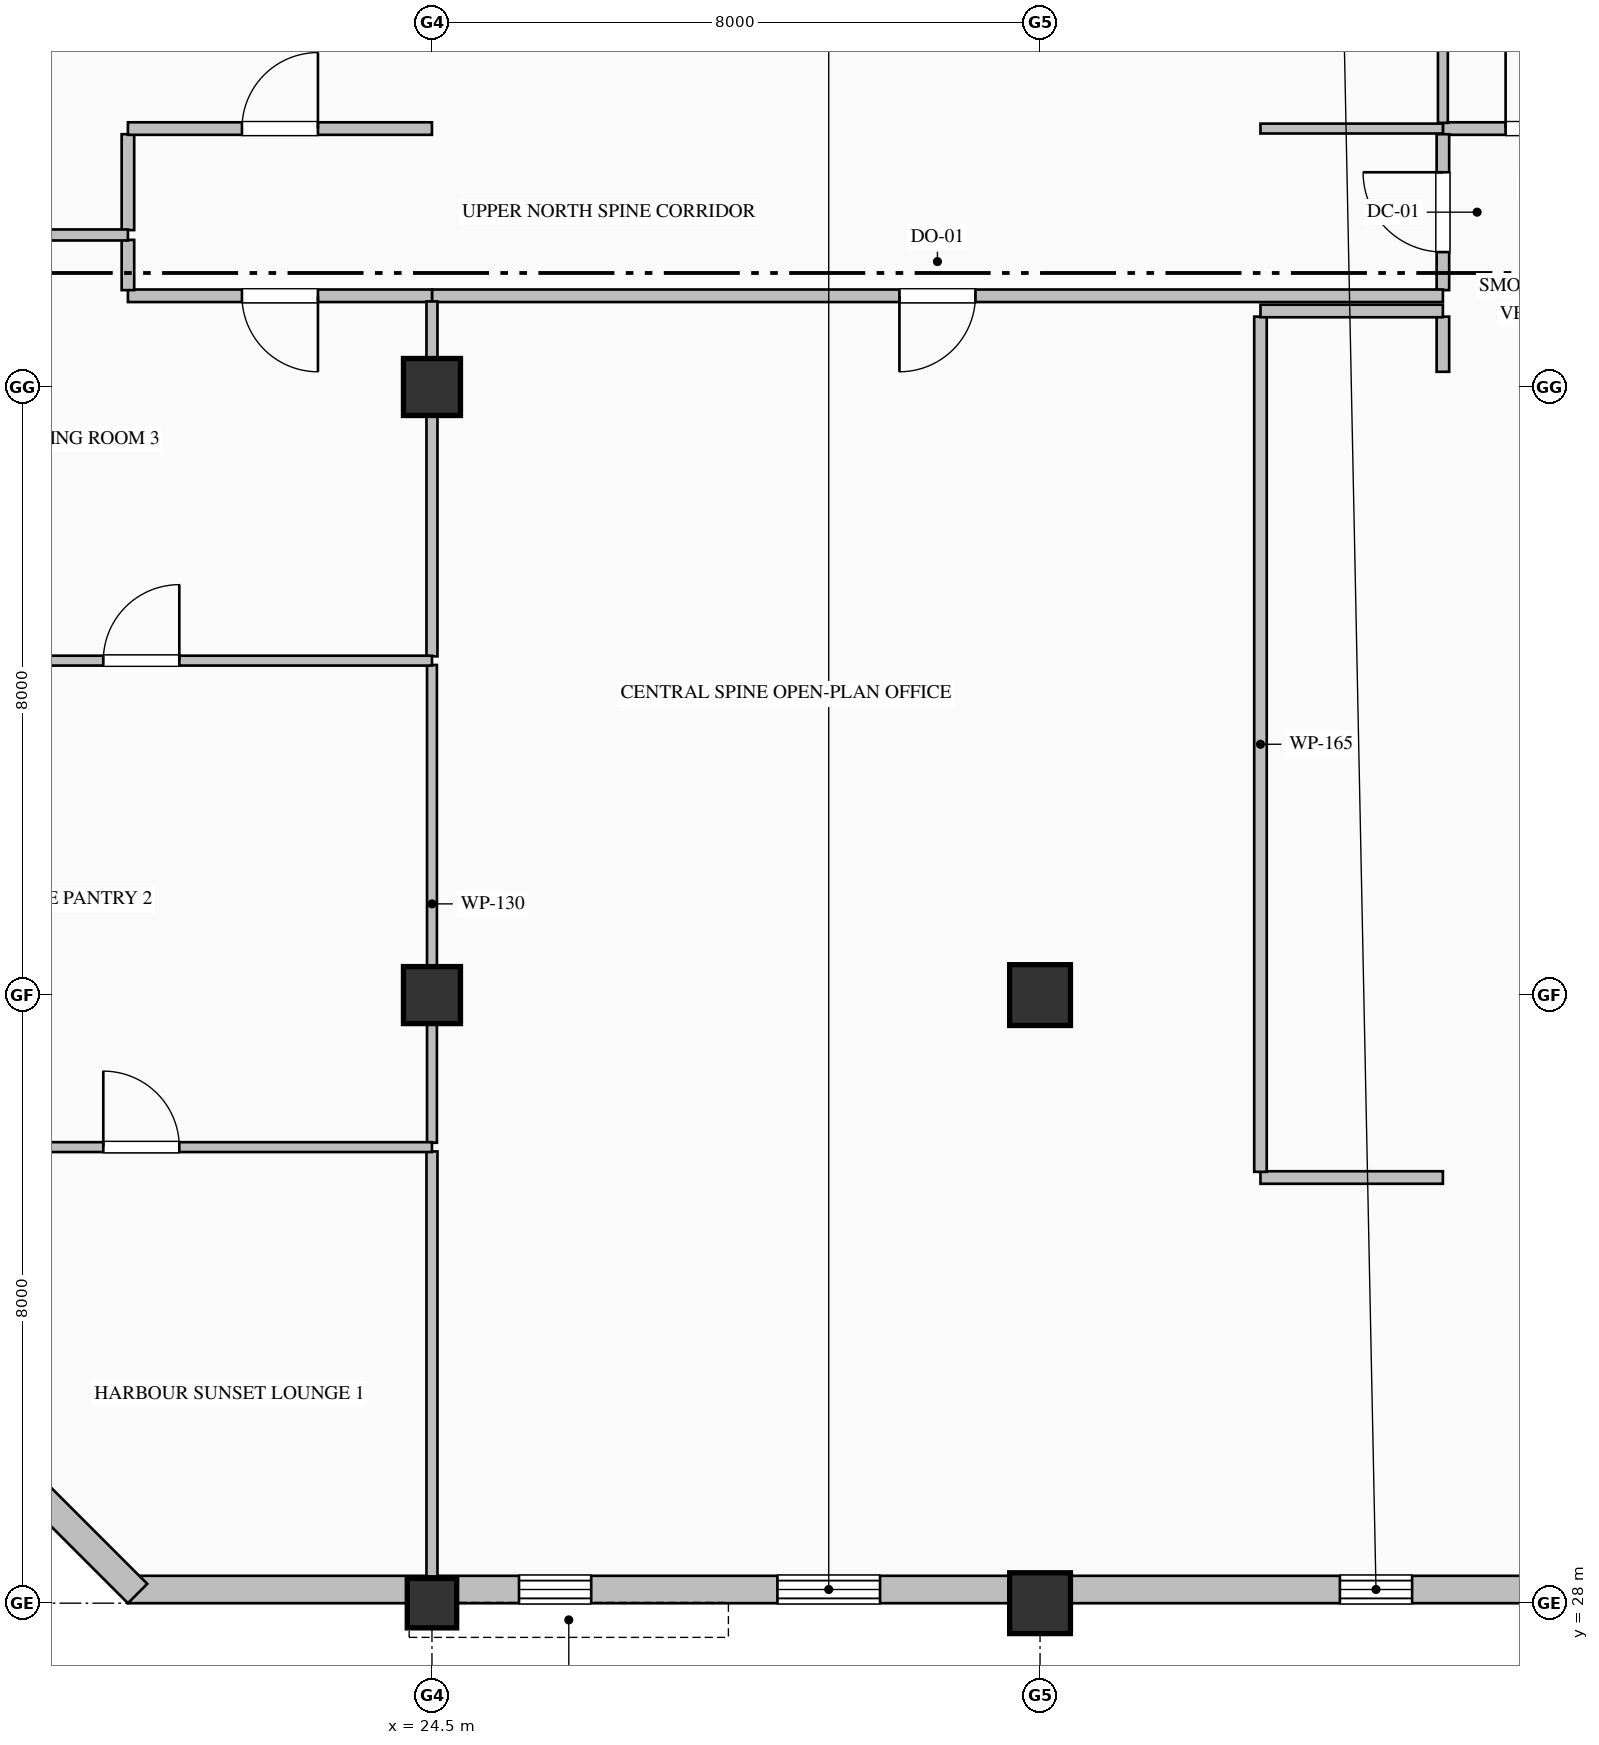
"""IFC4 building model, lengths in metres.
Left out: names, types, materials, properties, quantities, classifications, styles, units other than length and angle.
Written with IfcOpenShell. Run it as: python <this file> out.ifc"""

import sys

from ifc_helpers import new_model, si_unit, direction, frame, frame_2d, origin, origin_2d, place, context, subcontext, project, spatial, rectangle, hollow_rectangle, extrude, element, fill, save


model = new_model("IFC4")
c1 = context("Model", 3, precision=1e-05, world=origin(), true_north=direction((0.0, 1.0)))
c2 = subcontext(c1, "Body", "Model", "MODEL_VIEW")
j1 = project(units=[si_unit("LENGTHUNIT", "METRE"), si_unit("PLANEANGLEUNIT", "RADIAN")], contexts=[c1])
p1 = place(None, origin())
s1 = spatial("IfcSite", under=j1, at=p1, CompositionType="ELEMENT")
p2 = place(p1, origin())
s2 = spatial("IfcBuilding", under=s1, at=p2, CompositionType="ELEMENT")
p3 = place(p2, frame((0.0, 0.0, 331.2)))
s3 = spatial("IfcBuildingStorey", under=s2, at=p3, CompositionType="ELEMENT", Elevation=331.2)
p4 = place(p3, frame((24.5, 28.0, 0.0), z_axis=(0.0, 0.0, 1.0), x_axis=(1.0, 0.0, 0.0)))
e1 = element("IfcColumn", 1, at=p4, inside=s3, PredefinedType="COLUMN", context=c2, shape_type="SweptSolid", body=[
    extrude(hollow_rectangle(XDim=0.65, YDim=0.65, WallThickness=0.028, at=origin_2d()), origin(), (0.0, 0.0, 1.0), 4.0),
])
for number, where, z_axis, x_axis in (
    (2, (24.5, 36.0, 0.0), (0.0, 0.0, 1.0), (1.0, 0.0, 0.0)),
    (3, (24.5, 44.0, 0.0), (0.0, 0.0, 1.0), (1.0, 0.0, 0.0)),
):
    element("IfcColumn", number, at=place(p3, frame(where, z_axis=z_axis, x_axis=x_axis)), inside=s3, PredefinedType="COLUMN", context=c2, shape_type="SweptSolid", body=[
        extrude(rectangle(XDim=0.75, YDim=0.75, at=origin_2d()), origin(), (0.0, 0.0, 1.0), 4.0),
    ])
for number, where, z_axis, x_axis in (
    (4, (32.5, 28.0, 0.0), (0.0, 0.0, 1.0), (1.0, 0.0, 0.0)),
    (5, (32.5, 36.0, 0.0), (0.0, 0.0, 1.0), (1.0, 0.0, 0.0)),
):
    element("IfcColumn", number, at=place(p3, frame(where, z_axis=z_axis, x_axis=x_axis)), inside=s3, PredefinedType="COLUMN", context=c2, shape_type="SweptSolid", body=[
        extrude(hollow_rectangle(XDim=0.8, YDim=0.8, WallThickness=0.032, at=origin_2d()), origin(), (0.0, 0.0, 1.0), 4.0),
    ])
p5 = place(p3, frame((40.52, 28.18, 0.0), z_axis=(0.0, 0.0, 1.0), x_axis=(-1.0, 0.0, 0.0)))
e6 = element("IfcWall", 6, at=p5, inside=s3, PredefinedType="SOLIDWALL", context=c2, shape_type="SweptSolid", body=[
    extrude(rectangle(XDim=20.02, YDim=0.36, at=frame_2d((10.01, 0.0))), origin(), (0.0, 0.0, 1.0), 3.185),
])
p6 = place(p5, frame((3.125, 0.0, 0.9)))
e7 = element("IfcOpeningElement", 7, at=p6, cuts=e6, PredefinedType="OPENING", context=c2, shape_type="SweptSolid", body=[
    extrude(rectangle(XDim=0.95, YDim=1.85, at=frame_2d((0.475, 0.925))), frame((0.0, 0.19, 0.0), z_axis=(0.0, -1.0, 0.0), x_axis=(1.0, 0.0, 0.0)), (0.0, 0.0, 1.0), 0.38),
])
p7 = place(p5, frame((10.125, 0.0, 0.9)))
e8 = element("IfcOpeningElement", 8, at=p7, cuts=e6, PredefinedType="OPENING", context=c2, shape_type="SweptSolid", body=[
    extrude(rectangle(XDim=1.35, YDim=1.85, at=frame_2d((0.675, 0.925))), frame((0.0, 0.19, 0.0), z_axis=(0.0, -1.0, 0.0), x_axis=(1.0, 0.0, 0.0)), (0.0, 0.0, 1.0), 0.38),
])
p8 = place(p5, frame((13.925, 0.0, 0.9)))
e9 = element("IfcOpeningElement", 9, at=p8, cuts=e6, PredefinedType="OPENING", context=c2, shape_type="SweptSolid", body=[
    extrude(rectangle(XDim=0.95, YDim=1.85, at=frame_2d((0.475, 0.925))), frame((0.0, 0.19, 0.0), z_axis=(0.0, -1.0, 0.0), x_axis=(1.0, 0.0, 0.0)), (0.0, 0.0, 1.0), 0.38),
])
for number, where, z_axis, x_axis in (
    (10, (20.627, 28.127, 0.0), (0.0, 0.0, 1.0), (-0.707, 0.707, 0.0)),
    (11, (16.627, 47.873, 0.0), (0.0, 0.0, 1.0), (0.707, 0.707, 0.0)),
):
    element("IfcWall", number, at=place(p3, frame(where, z_axis=z_axis, x_axis=x_axis)), inside=s3, PredefinedType="SOLIDWALL", context=c2, shape_type="SweptSolid", body=[
        extrude(rectangle(XDim=5.657, YDim=0.36, at=frame_2d((2.828, 0.0))), origin(), (0.0, 0.0, 1.0), 3.785),
    ])
p9 = place(p3, frame((37.8, 47.4, 0.0), z_axis=(0.0, 0.0, 1.0), x_axis=(1.0, 0.0, 0.0)))
e12 = element("IfcWall", 12, at=p9, inside=s3, PredefinedType="PARTITIONING", context=c2, shape_type="SweptSolid", body=[
    extrude(rectangle(XDim=2.7, YDim=0.165, at=frame_2d((1.35, 0.0))), origin(), (0.0, 0.0, 1.0), 3.785),
])
p10 = place(p9, frame((0.825, 0.0, 0.0)))
e13 = element("IfcOpeningElement", 13, at=p10, cuts=e12, PredefinedType="OPENING", context=c2, shape_type="SweptSolid", body=[
    extrude(rectangle(XDim=1.05, YDim=2.15, at=frame_2d((0.525, 1.075))), frame((0.0, 0.093, 0.0), z_axis=(0.0, -1.0, 0.0), x_axis=(1.0, 0.0, 0.0)), (0.0, 0.0, 1.0), 0.185),
])
p11 = place(p3, frame((37.8, 45.274, 0.0), z_axis=(0.0, 0.0, 1.0), x_axis=(0.0, 1.0, 0.0)))
e14 = element("IfcWall", 14, at=p11, inside=s3, PredefinedType="PARTITIONING", context=c2, shape_type="SweptSolid", body=[
    extrude(rectangle(XDim=2.051, YDim=0.165, at=frame_2d((1.025, 0.0))), origin(), (0.0, 0.0, 1.0), 3.785),
])
p12 = place(p11, frame((0.5, 0.0, 0.0)))
e15 = element("IfcOpeningElement", 15, at=p12, cuts=e14, PredefinedType="OPENING", context=c2, shape_type="SweptSolid", body=[
    extrude(rectangle(XDim=1.05, YDim=2.15, at=frame_2d((0.525, 1.075))), frame((0.0, 0.093, 0.0), z_axis=(0.0, -1.0, 0.0), x_axis=(1.0, 0.0, 0.0)), (0.0, 0.0, 1.0), 0.185),
])
p13 = place(p3, frame((37.8, 44.2, 0.0), z_axis=(0.0, 0.0, 1.0), x_axis=(0.0, 1.0, 0.0)))
e16 = element("IfcWall", 16, at=p13, inside=s3, PredefinedType="PARTITIONING", context=c2, shape_type="SweptSolid", body=[
    extrude(rectangle(XDim=0.726, YDim=0.165, at=frame_2d((0.363, 0.0))), origin(), (0.0, 0.0, 1.0), 3.785),
])
p14 = place(p3, frame((37.8, 47.475, 0.0), z_axis=(0.0, 0.0, 1.0), x_axis=(0.0, 1.0, 0.0)))
e17 = element("IfcWall", 17, at=p14, inside=s3, PredefinedType="PARTITIONING", context=c2, shape_type="SweptSolid", body=[
    extrude(rectangle(XDim=4.173, YDim=0.13, at=frame_2d((2.087, 0.0))), origin(), (0.0, 0.0, 1.0), 3.785),
])
p15 = place(p14, frame((1.577, 0.0, 0.0)))
e18 = element("IfcOpeningElement", 18, at=p15, cuts=e17, PredefinedType="OPENING", context=c2, shape_type="SweptSolid", body=[
    extrude(rectangle(XDim=1.02, YDim=2.15, at=frame_2d((0.51, 1.075))), frame((0.0, 0.075, 0.0), z_axis=(0.0, -1.0, 0.0), x_axis=(1.0, 0.0, 0.0)), (0.0, 0.0, 1.0), 0.15),
])
p16 = place(p3, frame((37.8, 47.4, 0.0), z_axis=(0.0, 0.0, 1.0), x_axis=(-1.0, 0.0, 0.0)))
e19 = element("IfcWall", 19, at=p16, inside=s3, PredefinedType="PARTITIONING", context=c2, shape_type="SweptSolid", body=[
    extrude(rectangle(XDim=2.4, YDim=0.13, at=frame_2d((1.2, 0.0))), origin(), (0.0, 0.0, 1.0), 3.785),
])
p17 = place(p3, frame((37.8, 45.2, 0.0), z_axis=(0.0, 0.0, 1.0), x_axis=(-1.0, 0.0, 0.0)))
e20 = element("IfcWall", 20, at=p17, inside=s3, PredefinedType="PARTITIONING", context=c2, shape_type="SweptSolid", body=[
    extrude(rectangle(XDim=13.3, YDim=0.165, at=frame_2d((6.65, 0.0))), origin(), (0.0, 0.0, 1.0), 3.785),
])
p18 = place(p17, frame((6.15, 0.0, 0.0)))
e21 = element("IfcOpeningElement", 21, at=p18, cuts=e20, PredefinedType="OPENING", context=c2, shape_type="SweptSolid", body=[
    extrude(rectangle(XDim=1.0, YDim=2.15, at=frame_2d((0.5, 1.075))), frame((0.0, 0.093, 0.0), z_axis=(0.0, -1.0, 0.0), x_axis=(1.0, 0.0, 0.0)), (0.0, 0.0, 1.0), 0.185),
])
p19 = place(p3, frame((24.5, 45.2, 0.0), z_axis=(0.0, 0.0, 1.0), x_axis=(-1.0, 0.0, 0.0)))
e22 = element("IfcWall", 22, at=p19, inside=s3, PredefinedType="PARTITIONING", context=c2, shape_type="SweptSolid", body=[
    extrude(rectangle(XDim=4.0, YDim=0.165, at=frame_2d((2.0, 0.0))), origin(), (0.0, 0.0, 1.0), 3.785),
])
p20 = place(p19, frame((1.5, 0.0, 0.0)))
e23 = element("IfcOpeningElement", 23, at=p20, cuts=e22, PredefinedType="OPENING", context=c2, shape_type="SweptSolid", body=[
    extrude(rectangle(XDim=1.0, YDim=2.15, at=frame_2d((0.5, 1.075))), frame((0.0, 0.093, 0.0), z_axis=(0.0, -1.0, 0.0), x_axis=(1.0, 0.0, 0.0)), (0.0, 0.0, 1.0), 0.185),
])
p21 = place(p3, frame((20.5, 45.274, 0.0), z_axis=(0.0, 0.0, 1.0), x_axis=(0.0, 1.0, 0.0)))
e24 = element("IfcWall", 24, at=p21, inside=s3, PredefinedType="PARTITIONING", context=c2, shape_type="SweptSolid", body=[
    extrude(rectangle(XDim=0.661, YDim=0.165, at=frame_2d((0.331, 0.0))), origin(), (0.0, 0.0, 1.0), 3.785),
])
p22 = place(p3, frame((20.5, 46.064, 0.0), z_axis=(0.0, 0.0, 1.0), x_axis=(0.0, 1.0, 0.0)))
e25 = element("IfcWall", 25, at=p22, inside=s3, PredefinedType="PARTITIONING", context=c2, shape_type="SweptSolid", body=[
    extrude(rectangle(XDim=1.261, YDim=0.165, at=frame_2d((0.63, 0.0))), origin(), (0.0, 0.0, 1.0), 3.785),
])
p23 = place(p3, frame((20.5, 47.4, 0.0), z_axis=(0.0, 0.0, 1.0), x_axis=(1.0, 0.0, 0.0)))
e26 = element("IfcWall", 26, at=p23, inside=s3, PredefinedType="PARTITIONING", context=c2, shape_type="SweptSolid", body=[
    extrude(rectangle(XDim=4.0, YDim=0.165, at=frame_2d((2.0, 0.0))), origin(), (0.0, 0.0, 1.0), 3.785),
])
p24 = place(p23, frame((1.5, 0.0, 0.0)))
e27 = element("IfcOpeningElement", 27, at=p24, cuts=e26, PredefinedType="OPENING", context=c2, shape_type="SweptSolid", body=[
    extrude(rectangle(XDim=1.0, YDim=2.15, at=frame_2d((0.5, 1.075))), frame((0.0, 0.093, 0.0), z_axis=(0.0, -1.0, 0.0), x_axis=(1.0, 0.0, 0.0)), (0.0, 0.0, 1.0), 0.185),
])
p25 = place(p3, frame((37.8, 33.6, 0.0), z_axis=(0.0, 0.0, 1.0), x_axis=(-1.0, 0.0, 0.0)))
e28 = element("IfcWall", 28, at=p25, inside=s3, PredefinedType="PARTITIONING", context=c2, shape_type="SweptSolid", body=[
    extrude(rectangle(XDim=2.4, YDim=0.165, at=frame_2d((1.2, 0.0))), origin(), (0.0, 0.0, 1.0), 3.785),
])
p26 = place(p3, frame((35.4, 33.675, 0.0), z_axis=(0.0, 0.0, 1.0), x_axis=(0.0, 1.0, 0.0)))
e29 = element("IfcWall", 29, at=p26, inside=s3, PredefinedType="PARTITIONING", context=c2, shape_type="SweptSolid", body=[
    extrude(rectangle(XDim=11.251, YDim=0.165, at=frame_2d((5.625, 0.0))), origin(), (0.0, 0.0, 1.0), 3.785),
])
p27 = place(p3, frame((35.4, 45.0, 0.0), z_axis=(0.0, 0.0, 1.0), x_axis=(1.0, 0.0, 0.0)))
e30 = element("IfcWall", 30, at=p27, inside=s3, PredefinedType="PARTITIONING", context=c2, shape_type="SweptSolid", body=[
    extrude(rectangle(XDim=2.4, YDim=0.165, at=frame_2d((1.2, 0.0))), origin(), (0.0, 0.0, 1.0), 3.785),
])
p28 = place(p3, frame((24.5, 28.352, 0.0), z_axis=(0.0, 0.0, 1.0), x_axis=(0.0, 1.0, 0.0)))
e31 = element("IfcWall", 31, at=p28, inside=s3, PredefinedType="PARTITIONING", context=c2, shape_type="SweptSolid", body=[
    extrude(rectangle(XDim=5.591, YDim=0.145, at=frame_2d((2.795, 0.0))), origin(), (0.0, 0.0, 1.0), 3.177),
])
p29 = place(p3, frame((24.5, 34.057, 0.0), z_axis=(0.0, 0.0, 1.0), x_axis=(0.0, 1.0, 0.0)))
e32 = element("IfcWall", 32, at=p29, inside=s3, PredefinedType="PARTITIONING", context=c2, shape_type="SweptSolid", body=[
    extrude(rectangle(XDim=6.286, YDim=0.13, at=frame_2d((3.143, 0.0))), origin(), (0.0, 0.0, 1.0), 3.177),
])
p30 = place(p3, frame((24.5, 40.457, 0.0), z_axis=(0.0, 0.0, 1.0), x_axis=(0.0, 1.0, 0.0)))
e33 = element("IfcWall", 33, at=p30, inside=s3, PredefinedType="PARTITIONING", context=c2, shape_type="SweptSolid", body=[
    extrude(rectangle(XDim=4.668, YDim=0.145, at=frame_2d((2.334, 0.0))), origin(), (0.0, 0.0, 1.0), 3.177),
])
p31 = place(p3, frame((16.852, 34.0, 0.0), z_axis=(0.0, 0.0, 1.0), x_axis=(1.0, 0.0, 0.0)))
e34 = element("IfcWall", 34, at=p31, inside=s3, PredefinedType="PARTITIONING", context=c2, shape_type="SweptSolid", body=[
    extrude(rectangle(XDim=7.648, YDim=0.13, at=frame_2d((3.824, 0.0))), origin(), (0.0, 0.0, 1.0), 3.785),
])
p32 = place(p31, frame((3.324, 0.0, 0.0)))
e35 = element("IfcOpeningElement", 35, at=p32, cuts=e34, PredefinedType="OPENING", context=c2, shape_type="SweptSolid", body=[
    extrude(rectangle(XDim=1.0, YDim=2.15, at=frame_2d((0.5, 1.075))), frame((0.0, 0.075, 0.0), z_axis=(0.0, -1.0, 0.0), x_axis=(1.0, 0.0, 0.0)), (0.0, 0.0, 1.0), 0.15),
])
p33 = place(p3, frame((16.852, 40.4, 0.0), z_axis=(0.0, 0.0, 1.0), x_axis=(1.0, 0.0, 0.0)))
e36 = element("IfcWall", 36, at=p33, inside=s3, PredefinedType="PARTITIONING", context=c2, shape_type="SweptSolid", body=[
    extrude(rectangle(XDim=7.648, YDim=0.13, at=frame_2d((3.824, 0.0))), origin(), (0.0, 0.0, 1.0), 3.785),
])
p34 = place(p33, frame((3.324, 0.0, 0.0)))
e37 = element("IfcOpeningElement", 37, at=p34, cuts=e36, PredefinedType="OPENING", context=c2, shape_type="SweptSolid", body=[
    extrude(rectangle(XDim=1.0, YDim=2.15, at=frame_2d((0.5, 1.075))), frame((0.0, 0.075, 0.0), z_axis=(0.0, -1.0, 0.0), x_axis=(1.0, 0.0, 0.0)), (0.0, 0.0, 1.0), 0.15),
])
p35 = place(p3, frame((16.852, 46.0, 0.0), z_axis=(0.0, 0.0, 1.0), x_axis=(1.0, 0.0, 0.0)))
e38 = element("IfcWall", 38, at=p35, inside=s3, PredefinedType="PARTITIONING", context=c2, shape_type="SweptSolid", body=[
    extrude(rectangle(XDim=3.648, YDim=0.145, at=frame_2d((1.824, 0.0))), origin(), (0.0, 0.0, 1.0), 3.785),
])
p36 = place(p6, origin())
e39 = element("IfcWindow", 39, at=p36, inside=s3, PartitioningType="SINGLE_PANEL", PredefinedType="WINDOW", context=c2, shape_type="SweptSolid", body=[
    extrude(rectangle(XDim=0.95, YDim=1.85, at=frame_2d((0.475, 0.925))), frame((0.0, 0.15, 0.0), z_axis=(0.0, -1.0, 0.0), x_axis=(1.0, 0.0, 0.0)), (0.0, 0.0, 1.0), 0.06),
])
fill(e7, e39)
p37 = place(p7, origin())
e40 = element("IfcWindow", 40, at=p37, inside=s3, PartitioningType="DOUBLE_PANEL_VERTICAL", PredefinedType="WINDOW", context=c2, shape_type="SweptSolid", body=[
    extrude(rectangle(XDim=1.35, YDim=1.85, at=frame_2d((0.675, 0.925))), frame((0.0, 0.15, 0.0), z_axis=(0.0, -1.0, 0.0), x_axis=(1.0, 0.0, 0.0)), (0.0, 0.0, 1.0), 0.06),
])
fill(e8, e40)
p38 = place(p8, origin())
e41 = element("IfcWindow", 41, at=p38, inside=s3, PartitioningType="SINGLE_PANEL", PredefinedType="WINDOW", context=c2, shape_type="SweptSolid", body=[
    extrude(rectangle(XDim=0.95, YDim=1.85, at=frame_2d((0.475, 0.925))), frame((0.0, 0.15, 0.0), z_axis=(0.0, -1.0, 0.0), x_axis=(1.0, 0.0, 0.0)), (0.0, 0.0, 1.0), 0.06),
])
fill(e9, e41)
p39 = place(p10, origin())
e42 = element("IfcDoor", 42, at=p39, inside=s3, OperationType="SINGLE_SWING_LEFT", PredefinedType="DOOR", context=c2, shape_type="SweptSolid", body=[
    extrude(rectangle(XDim=1.05, YDim=2.15, at=frame_2d((0.525, 1.075))), frame((0.0, 0.025, 0.0), z_axis=(0.0, -1.0, 0.0), x_axis=(1.0, 0.0, 0.0)), (0.0, 0.0, 1.0), 0.05),
])
fill(e13, e42)
p40 = place(p12, origin())
e43 = element("IfcDoor", 43, at=p40, inside=s3, OperationType="SINGLE_SWING_RIGHT", PredefinedType="DOOR", context=c2, shape_type="SweptSolid", body=[
    extrude(rectangle(XDim=1.05, YDim=2.15, at=frame_2d((0.525, 1.075))), frame((0.0, 0.025, 0.0), z_axis=(0.0, -1.0, 0.0), x_axis=(1.0, 0.0, 0.0)), (0.0, 0.0, 1.0), 0.05),
])
fill(e15, e43)
p41 = place(p18, origin())
e44 = element("IfcDoor", 44, at=p41, inside=s3, OperationType="SINGLE_SWING_RIGHT", PredefinedType="DOOR", context=c2, shape_type="SweptSolid", body=[
    extrude(rectangle(XDim=1.0, YDim=2.15, at=frame_2d((0.5, 1.075))), frame((0.0, 0.025, 0.0), z_axis=(0.0, -1.0, 0.0), x_axis=(1.0, 0.0, 0.0)), (0.0, 0.0, 1.0), 0.05),
])
fill(e21, e44)
p42 = place(p32, origin())
e45 = element("IfcDoor", 45, at=p42, inside=s3, OperationType="SINGLE_SWING_LEFT", PredefinedType="DOOR", context=c2, shape_type="SweptSolid", body=[
    extrude(rectangle(XDim=1.0, YDim=2.15, at=frame_2d((0.5, 1.075))), frame((0.0, 0.025, 0.0), z_axis=(0.0, -1.0, 0.0), x_axis=(1.0, 0.0, 0.0)), (0.0, 0.0, 1.0), 0.05),
])
fill(e35, e45)
p43 = place(p34, origin())
e46 = element("IfcDoor", 46, at=p43, inside=s3, OperationType="SINGLE_SWING_RIGHT", PredefinedType="DOOR", context=c2, shape_type="SweptSolid", body=[
    extrude(rectangle(XDim=1.0, YDim=2.15, at=frame_2d((0.5, 1.075))), frame((0.0, 0.025, 0.0), z_axis=(0.0, -1.0, 0.0), x_axis=(1.0, 0.0, 0.0)), (0.0, 0.0, 1.0), 0.05),
])
fill(e37, e46)
p44 = place(p20, origin())
e47 = element("IfcDoor", 47, at=p44, inside=s3, OperationType="SINGLE_SWING_LEFT", PredefinedType="DOOR", context=c2, shape_type="SweptSolid", body=[
    extrude(rectangle(XDim=1.0, YDim=2.15, at=frame_2d((0.5, 1.075))), frame((0.0, 0.025, 0.0), z_axis=(0.0, -1.0, 0.0), x_axis=(1.0, 0.0, 0.0)), (0.0, 0.0, 1.0), 0.05),
])
fill(e23, e47)
p45 = place(p24, origin())
e48 = element("IfcDoor", 48, at=p45, inside=s3, OperationType="SINGLE_SWING_RIGHT", PredefinedType="DOOR", context=c2, shape_type="SweptSolid", body=[
    extrude(rectangle(XDim=1.0, YDim=2.15, at=frame_2d((0.5, 1.075))), frame((0.0, 0.025, 0.0), z_axis=(0.0, -1.0, 0.0), x_axis=(1.0, 0.0, 0.0)), (0.0, 0.0, 1.0), 0.05),
])
fill(e27, e48)
save(model, sys.argv[1])
